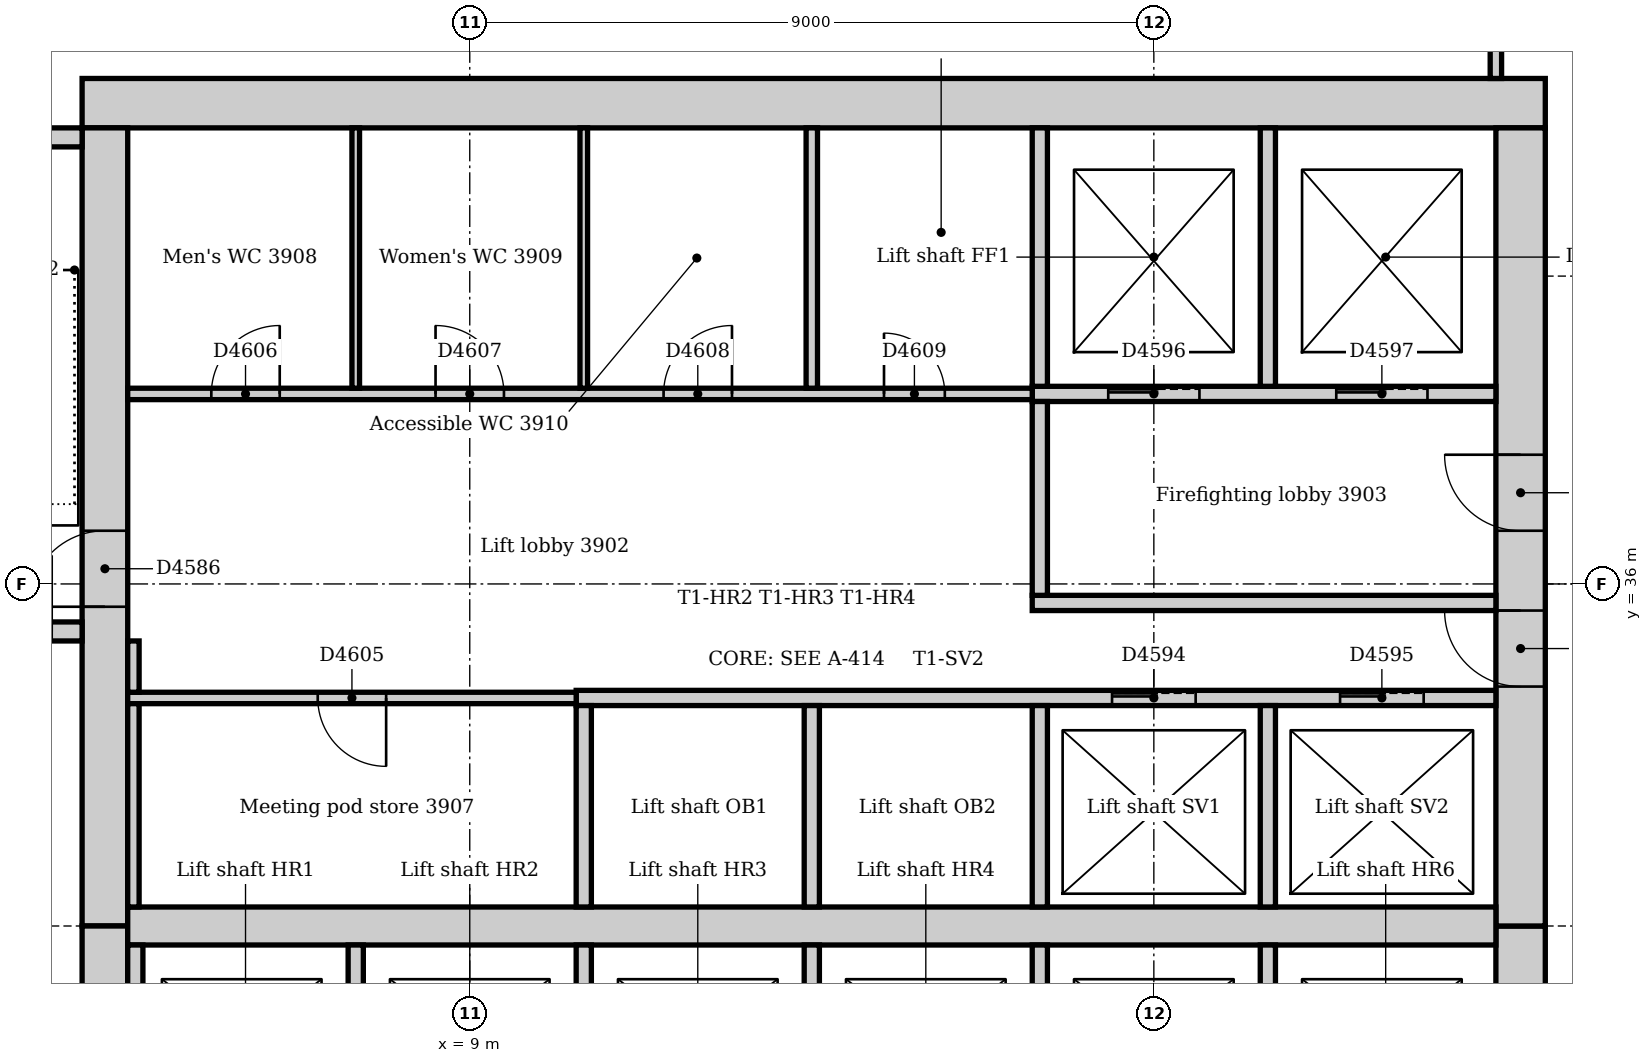
"""IFC4 building model, lengths in metres.
Left out: names, types, materials, properties, quantities, classifications, styles, units other than length and angle.
Written with IfcOpenShell. Run it as: python <this file> out.ifc"""

import sys

from ifc_helpers import new_model, si_unit, direction, frame, frame_2d, origin, place, context, subcontext, project, spatial, rectangle, extrude, element, fill, save


model = new_model("IFC4")
c1 = context("Model", 3, precision=1e-05, world=origin(), true_north=direction((0.0, 1.0)))
c2 = subcontext(c1, "Body", "Model", "MODEL_VIEW")
j1 = project(units=[si_unit("LENGTHUNIT", "METRE"), si_unit("PLANEANGLEUNIT", "RADIAN")], contexts=[c1])
p1 = place(None, origin())
s1 = spatial("IfcSite", under=j1, at=p1, CompositionType="ELEMENT")
p2 = place(p1, origin())
s2 = spatial("IfcBuilding", under=s1, at=p2, CompositionType="ELEMENT")
p3 = place(p2, frame((0.0, 0.0, 165.0)))
s3 = spatial("IfcBuildingStorey", under=s2, at=p3, CompositionType="ELEMENT", Elevation=165.0)
p4 = place(p3, frame((23.15, 42.325, 0.0), z_axis=(0.0, 0.0, 1.0), x_axis=(-1.0, 0.0, 0.0)))
e1 = element("IfcWall", 1, at=p4, inside=s3, PredefinedType="SOLIDWALL", context=c2, shape_type="SweptSolid", body=[
    extrude(rectangle(XDim=19.25, YDim=0.65, at=frame_2d((9.625, 0.0))), origin(), (0.0, 0.0, 1.0), 4.0),
])
p5 = place(p3, frame((22.825, 21.0, 0.0), z_axis=(0.0, 0.0, 1.0), x_axis=(0.0, 1.0, 0.0)))
e2 = element("IfcWall", 2, at=p5, inside=s3, PredefinedType="SOLIDWALL", context=c2, shape_type="SweptSolid", body=[
    extrude(rectangle(XDim=10.5, YDim=0.65, at=frame_2d((5.25, 0.0))), origin(), (0.0, 0.0, 1.0), 4.0),
])
p6 = place(p5, frame((4.35, 0.0, 0.0)))
e3 = element("IfcOpeningElement", 3, at=p6, cuts=e2, PredefinedType="OPENING", context=c2, shape_type="SweptSolid", body=[
    extrude(rectangle(XDim=1.8, YDim=2.1, at=frame_2d((0.9, 1.05))), frame((0.0, 0.335, 0.0), z_axis=(0.0, -1.0, 0.0), x_axis=(1.0, 0.0, 0.0)), (0.0, 0.0, 1.0), 0.67),
])
p7 = place(p3, frame((22.825, 31.5, 0.0), z_axis=(0.0, 0.0, 1.0), x_axis=(0.0, 1.0, 0.0)))
e4 = element("IfcWall", 4, at=p7, inside=s3, PredefinedType="SOLIDWALL", context=c2, shape_type="SweptSolid", body=[
    extrude(rectangle(XDim=10.5, YDim=0.65, at=frame_2d((5.25, 0.0))), origin(), (0.0, 0.0, 1.0), 4.0),
])
p8 = place(p7, frame((3.15, 0.0, 0.0)))
e5 = element("IfcOpeningElement", 5, at=p8, cuts=e4, PredefinedType="OPENING", context=c2, shape_type="SweptSolid", body=[
    extrude(rectangle(XDim=1.0, YDim=2.1, at=frame_2d((0.5, 1.05))), frame((0.0, 0.335, 0.0), z_axis=(0.0, -1.0, 0.0), x_axis=(1.0, 0.0, 0.0)), (0.0, 0.0, 1.0), 0.67),
])
p9 = place(p7, frame((5.2, 0.0, 0.0)))
e6 = element("IfcOpeningElement", 6, at=p9, cuts=e4, PredefinedType="OPENING", context=c2, shape_type="SweptSolid", body=[
    extrude(rectangle(XDim=1.0, YDim=2.1, at=frame_2d((0.5, 1.05))), frame((0.0, 0.335, 0.0), z_axis=(0.0, -1.0, 0.0), x_axis=(1.0, 0.0, 0.0)), (0.0, 0.0, 1.0), 0.67),
])
p10 = place(p3, frame((4.2, 42.0, 0.0), z_axis=(0.0, 0.0, 1.0), x_axis=(0.0, -1.0, 0.0)))
e7 = element("IfcWall", 7, at=p10, inside=s3, PredefinedType="SOLIDWALL", context=c2, shape_type="SweptSolid", body=[
    extrude(rectangle(XDim=10.5, YDim=0.6, at=frame_2d((5.25, 0.0))), origin(), (0.0, 0.0, 1.0), 4.0),
])
p11 = place(p10, frame((5.3, 0.0, 0.0)))
e8 = element("IfcOpeningElement", 8, at=p11, cuts=e7, PredefinedType="OPENING", context=c2, shape_type="SweptSolid", body=[
    extrude(rectangle(XDim=1.0, YDim=2.1, at=frame_2d((0.5, 1.05))), frame((0.0, 0.31, 0.0), z_axis=(0.0, -1.0, 0.0), x_axis=(1.0, 0.0, 0.0)), (0.0, 0.0, 1.0), 0.62),
])
p12 = place(p3, frame((4.2, 31.5, 0.0), z_axis=(0.0, 0.0, 1.0), x_axis=(0.0, -1.0, 0.0)))
e9 = element("IfcWall", 9, at=p12, inside=s3, PredefinedType="SOLIDWALL", context=c2, shape_type="SweptSolid", body=[
    extrude(rectangle(XDim=10.5, YDim=0.6, at=frame_2d((5.25, 0.0))), origin(), (0.0, 0.0, 1.0), 4.0),
])
p13 = place(p12, frame((4.25, 0.0, 0.0)))
e10 = element("IfcOpeningElement", 10, at=p13, cuts=e9, PredefinedType="OPENING", context=c2, shape_type="SweptSolid", body=[
    extrude(rectangle(XDim=1.0, YDim=2.1, at=frame_2d((0.5, 1.05))), frame((0.0, 0.31, 0.0), z_axis=(0.0, -1.0, 0.0), x_axis=(1.0, 0.0, 0.0)), (0.0, 0.0, 1.0), 0.62),
])
p14 = place(p3, frame((4.5, 31.5, 0.0), z_axis=(0.0, 0.0, 1.0), x_axis=(1.0, 0.0, 0.0)))
e11 = element("IfcWall", 11, at=p14, inside=s3, PredefinedType="SOLIDWALL", context=c2, shape_type="SweptSolid", body=[
    extrude(rectangle(XDim=18.0, YDim=0.5, at=frame_2d((9.0, 0.0))), origin(), (0.0, 0.0, 1.0), 4.0),
])
p15 = place(p3, frame((0.36, 35.375, 0.0), z_axis=(0.0, 0.0, 1.0), x_axis=(1.0, 0.0, 0.0)))
e12 = element("IfcWall", 12, at=p15, inside=s3, PredefinedType="SOLIDWALL", context=c2, shape_type="SweptSolid", body=[
    extrude(rectangle(XDim=3.54, YDim=0.25, at=frame_2d((1.77, 0.0))), origin(), (0.0, 0.0, 1.0), 4.0),
])
p16 = place(p15, frame((2.14, 0.0, 0.0)))
e13 = element("IfcOpeningElement", 13, at=p16, cuts=e12, PredefinedType="OPENING", context=c2, shape_type="SweptSolid", body=[
    extrude(rectangle(XDim=1.0, YDim=2.1, at=frame_2d((0.5, 1.05))), frame((0.0, 0.135, 0.0), z_axis=(0.0, -1.0, 0.0), x_axis=(1.0, 0.0, 0.0)), (0.0, 0.0, 1.0), 0.27),
])
p17 = place(p3, frame((3.9, 41.875, 0.0), z_axis=(0.0, 0.0, 1.0), x_axis=(-1.0, 0.0, 0.0)))
e14 = element("IfcWall", 14, at=p17, inside=s3, PredefinedType="SOLIDWALL", context=c2, shape_type="SweptSolid", body=[
    extrude(rectangle(XDim=3.54, YDim=0.25, at=frame_2d((1.77, 0.0))), origin(), (0.0, 0.0, 1.0), 4.0),
])
p18 = place(p3, frame((16.4, 35.75, 0.0), z_axis=(0.0, 0.0, 1.0), x_axis=(1.0, 0.0, 0.0)))
e15 = element("IfcWall", 15, at=p18, inside=s3, PredefinedType="PARTITIONING", context=c2, shape_type="SweptSolid", body=[
    extrude(rectangle(XDim=6.1, YDim=0.2, at=frame_2d((3.05, 0.0))), origin(), (0.0, 0.0, 1.0), 3.85),
])
p19 = place(p3, frame((16.4, 38.5, 0.0), z_axis=(0.0, 0.0, 1.0), x_axis=(1.0, 0.0, 0.0)))
e16 = element("IfcWall", 16, at=p19, inside=s3, PredefinedType="PARTITIONING", context=c2, shape_type="SweptSolid", body=[
    extrude(rectangle(XDim=6.1, YDim=0.2, at=frame_2d((3.05, 0.0))), origin(), (0.0, 0.0, 1.0), 3.85),
])
p20 = place(p19, frame((1.0, 0.0, 0.0)))
e17 = element("IfcOpeningElement", 17, at=p20, cuts=e16, PredefinedType="OPENING", context=c2, shape_type="SweptSolid", body=[
    extrude(rectangle(XDim=1.2, YDim=2.1, at=frame_2d((0.6, 1.05))), frame((0.0, 0.11, 0.0), z_axis=(0.0, -1.0, 0.0), x_axis=(1.0, 0.0, 0.0)), (0.0, 0.0, 1.0), 0.22),
])
p21 = place(p19, frame((4.0, 0.0, 0.0)))
e18 = element("IfcOpeningElement", 18, at=p21, cuts=e16, PredefinedType="OPENING", context=c2, shape_type="SweptSolid", body=[
    extrude(rectangle(XDim=1.2, YDim=2.1, at=frame_2d((0.6, 1.05))), frame((0.0, 0.11, 0.0), z_axis=(0.0, -1.0, 0.0), x_axis=(1.0, 0.0, 0.0)), (0.0, 0.0, 1.0), 0.22),
])
p22 = place(p3, frame((16.5, 35.85, 0.0), z_axis=(0.0, 0.0, 1.0), x_axis=(0.0, 1.0, 0.0)))
e19 = element("IfcWall", 19, at=p22, inside=s3, PredefinedType="PARTITIONING", context=c2, shape_type="SweptSolid", body=[
    extrude(rectangle(XDim=2.55, YDim=0.2, at=frame_2d((1.275, 0.0))), origin(), (0.0, 0.0, 1.0), 3.85),
])
p23 = place(p3, frame((10.4, 34.5, 0.0), z_axis=(0.0, 0.0, 1.0), x_axis=(1.0, 0.0, 0.0)))
e20 = element("IfcWall", 20, at=p23, inside=s3, PredefinedType="PARTITIONING", context=c2, shape_type="SweptSolid", body=[
    extrude(rectangle(XDim=12.1, YDim=0.2, at=frame_2d((6.05, 0.0))), origin(), (0.0, 0.0, 1.0), 3.85),
])
p24 = place(p23, frame((7.05, 0.0, 0.0)))
e21 = element("IfcOpeningElement", 21, at=p24, cuts=e20, PredefinedType="OPENING", context=c2, shape_type="SweptSolid", body=[
    extrude(rectangle(XDim=1.1, YDim=2.1, at=frame_2d((0.55, 1.05))), frame((0.0, 0.11, 0.0), z_axis=(0.0, -1.0, 0.0), x_axis=(1.0, 0.0, 0.0)), (0.0, 0.0, 1.0), 0.22),
])
p25 = place(p23, frame((10.05, 0.0, 0.0)))
e22 = element("IfcOpeningElement", 22, at=p25, cuts=e20, PredefinedType="OPENING", context=c2, shape_type="SweptSolid", body=[
    extrude(rectangle(XDim=1.1, YDim=2.1, at=frame_2d((0.55, 1.05))), frame((0.0, 0.11, 0.0), z_axis=(0.0, -1.0, 0.0), x_axis=(1.0, 0.0, 0.0)), (0.0, 0.0, 1.0), 0.22),
])
for number, where, z_axis, x_axis in (
    (23, (10.5, 28.6, 0.0), (0.0, 0.0, 1.0), (0.0, 1.0, 0.0)),
    (24, (10.5, 31.75, 0.0), (0.0, 0.0, 1.0), (0.0, 1.0, 0.0)),
    (25, (13.5, 28.6, 0.0), (0.0, 0.0, 1.0), (0.0, 1.0, 0.0)),
    (26, (13.5, 31.75, 0.0), (0.0, 0.0, 1.0), (0.0, 1.0, 0.0)),
    (27, (16.5, 28.6, 0.0), (0.0, 0.0, 1.0), (0.0, 1.0, 0.0)),
    (28, (16.5, 31.75, 0.0), (0.0, 0.0, 1.0), (0.0, 1.0, 0.0)),
    (29, (19.5, 28.6, 0.0), (0.0, 0.0, 1.0), (0.0, 1.0, 0.0)),
    (30, (19.5, 31.75, 0.0), (0.0, 0.0, 1.0), (0.0, 1.0, 0.0)),
):
    element("IfcWall", number, at=place(p3, frame(where, z_axis=z_axis, x_axis=x_axis)), inside=s3, PredefinedType="PARTITIONING", context=c2, shape_type="SweptSolid", body=[
        extrude(rectangle(XDim=2.65, YDim=0.2, at=frame_2d((1.325, 0.0))), origin(), (0.0, 0.0, 1.0), 3.85),
    ])
for number, where, z_axis, x_axis in (
    (31, (16.5, 38.6, 0.0), (0.0, 0.0, 1.0), (0.0, 1.0, 0.0)),
    (32, (19.5, 38.6, 0.0), (0.0, 0.0, 1.0), (0.0, 1.0, 0.0)),
):
    element("IfcWall", number, at=place(p3, frame(where, z_axis=z_axis, x_axis=x_axis)), inside=s3, PredefinedType="PARTITIONING", context=c2, shape_type="SweptSolid", body=[
        extrude(rectangle(XDim=3.4, YDim=0.2, at=frame_2d((1.7, 0.0))), origin(), (0.0, 0.0, 1.0), 3.85),
    ])
for number, where, z_axis, x_axis in (
    (33, (4.6, 28.6, 0.0), (0.0, 0.0, 1.0), (0.0, 1.0, 0.0)),
    (34, (7.5, 28.6, 0.0), (0.0, 0.0, 1.0), (0.0, 1.0, 0.0)),
):
    element("IfcWall", number, at=place(p3, frame(where, z_axis=z_axis, x_axis=x_axis)), inside=s3, PredefinedType="PARTITIONING", context=c2, shape_type="SweptSolid", body=[
        extrude(rectangle(XDim=2.65, YDim=0.2, at=frame_2d((1.325, 0.0))), origin(), (0.0, 0.0, 1.0), 3.85),
    ])
p26 = place(p3, frame((4.5, 38.5, 0.0), z_axis=(0.0, 0.0, 1.0), x_axis=(1.0, 0.0, 0.0)))
e35 = element("IfcWall", 35, at=p26, inside=s3, PredefinedType="PARTITIONING", context=c2, shape_type="SweptSolid", body=[
    extrude(rectangle(XDim=11.9, YDim=0.15, at=frame_2d((5.95, 0.0))), origin(), (0.0, 0.0, 1.0), 3.85),
])
p27 = place(p26, frame((1.1, 0.0, 0.0)))
e36 = element("IfcOpeningElement", 36, at=p27, cuts=e35, PredefinedType="OPENING", context=c2, shape_type="SweptSolid", body=[
    extrude(rectangle(XDim=0.9, YDim=2.1, at=frame_2d((0.45, 1.05))), frame((0.0, 0.085, 0.0), z_axis=(0.0, -1.0, 0.0), x_axis=(1.0, 0.0, 0.0)), (0.0, 0.0, 1.0), 0.17),
])
p28 = place(p26, frame((4.05, 0.0, 0.0)))
e37 = element("IfcOpeningElement", 37, at=p28, cuts=e35, PredefinedType="OPENING", context=c2, shape_type="SweptSolid", body=[
    extrude(rectangle(XDim=0.9, YDim=2.1, at=frame_2d((0.45, 1.05))), frame((0.0, 0.085, 0.0), z_axis=(0.0, -1.0, 0.0), x_axis=(1.0, 0.0, 0.0)), (0.0, 0.0, 1.0), 0.17),
])
p29 = place(p26, frame((7.05, 0.0, 0.0)))
e38 = element("IfcOpeningElement", 38, at=p29, cuts=e35, PredefinedType="OPENING", context=c2, shape_type="SweptSolid", body=[
    extrude(rectangle(XDim=0.9, YDim=2.1, at=frame_2d((0.45, 1.05))), frame((0.0, 0.085, 0.0), z_axis=(0.0, -1.0, 0.0), x_axis=(1.0, 0.0, 0.0)), (0.0, 0.0, 1.0), 0.17),
])
p30 = place(p26, frame((9.95, 0.0, 0.0)))
e39 = element("IfcOpeningElement", 39, at=p30, cuts=e35, PredefinedType="OPENING", context=c2, shape_type="SweptSolid", body=[
    extrude(rectangle(XDim=0.8, YDim=2.1, at=frame_2d((0.4, 1.05))), frame((0.0, 0.085, 0.0), z_axis=(0.0, -1.0, 0.0), x_axis=(1.0, 0.0, 0.0)), (0.0, 0.0, 1.0), 0.17),
])
p31 = place(p3, frame((4.5, 34.5, 0.0), z_axis=(0.0, 0.0, 1.0), x_axis=(1.0, 0.0, 0.0)))
e40 = element("IfcWall", 40, at=p31, inside=s3, PredefinedType="PARTITIONING", context=c2, shape_type="SweptSolid", body=[
    extrude(rectangle(XDim=5.9, YDim=0.15, at=frame_2d((2.95, 0.0))), origin(), (0.0, 0.0, 1.0), 3.85),
])
p32 = place(p31, frame((2.5, 0.0, 0.0)))
e41 = element("IfcOpeningElement", 41, at=p32, cuts=e40, PredefinedType="OPENING", context=c2, shape_type="SweptSolid", body=[
    extrude(rectangle(XDim=0.9, YDim=2.1, at=frame_2d((0.45, 1.05))), frame((0.0, 0.085, 0.0), z_axis=(0.0, -1.0, 0.0), x_axis=(1.0, 0.0, 0.0)), (0.0, 0.0, 1.0), 0.17),
])
p33 = place(p3, frame((4.575, 34.575, 0.0), z_axis=(0.0, 0.0, 1.0), x_axis=(0.0, 1.0, 0.0)))
e42 = element("IfcWall", 42, at=p33, inside=s3, PredefinedType="PARTITIONING", context=c2, shape_type="SweptSolid", body=[
    extrude(rectangle(XDim=0.675, YDim=0.15, at=frame_2d((0.338, 0.0))), origin(), (0.0, 0.0, 1.0), 3.85),
])
p34 = place(p3, frame((4.575, 31.75, 0.0), z_axis=(0.0, 0.0, 1.0), x_axis=(0.0, 1.0, 0.0)))
e43 = element("IfcWall", 43, at=p34, inside=s3, PredefinedType="PARTITIONING", context=c2, shape_type="SweptSolid", body=[
    extrude(rectangle(XDim=2.675, YDim=0.15, at=frame_2d((1.337, 0.0))), origin(), (0.0, 0.0, 1.0), 3.85),
])
p35 = place(p3, frame((22.5, 42.65, 0.0), z_axis=(0.0, 0.0, 1.0), x_axis=(0.0, 1.0, 0.0)))
e44 = element("IfcWall", 44, at=p35, inside=s3, PredefinedType="PARTITIONING", context=c2, shape_type="SweptSolid", body=[
    extrude(rectangle(XDim=1.825, YDim=0.15, at=frame_2d((0.912, 0.0))), origin(), (0.0, 0.0, 1.0), 3.85),
])
p36 = place(p3, frame((13.5, 38.575, 0.0), z_axis=(0.0, 0.0, 1.0), x_axis=(0.0, 1.0, 0.0)))
e45 = element("IfcWall", 45, at=p36, inside=s3, PredefinedType="PARTITIONING", context=c2, shape_type="SweptSolid", body=[
    extrude(rectangle(XDim=3.425, YDim=0.15, at=frame_2d((1.712, 0.0))), origin(), (0.0, 0.0, 1.0), 3.85),
])
for number, where, z_axis, x_axis in (
    (46, (7.5, 38.575, 0.0), (0.0, 0.0, 1.0), (0.0, 1.0, 0.0)),
    (47, (10.5, 38.575, 0.0), (0.0, 0.0, 1.0), (0.0, 1.0, 0.0)),
):
    element("IfcWall", number, at=place(p3, frame(where, z_axis=z_axis, x_axis=x_axis)), inside=s3, PredefinedType="PARTITIONING", context=c2, shape_type="SweptSolid", body=[
        extrude(rectangle(XDim=3.425, YDim=0.1, at=frame_2d((1.712, 0.0))), origin(), (0.0, 0.0, 1.0), 3.85),
    ])
p37 = place(p11, frame((1.0, 0.0, 0.0), z_axis=(0.0, 0.0, 1.0), x_axis=(-1.0, 0.0, 0.0)))
e48 = element("IfcDoor", 48, at=p37, inside=s3, OperationType="SINGLE_SWING_LEFT", PredefinedType="DOOR", context=c2, shape_type="SweptSolid", body=[
    extrude(rectangle(XDim=1.0, YDim=2.1, at=frame_2d((0.5, 1.05))), frame((0.0, 0.025, 0.0), z_axis=(0.0, -1.0, 0.0), x_axis=(1.0, 0.0, 0.0)), (0.0, 0.0, 1.0), 0.05),
])
fill(e8, e48)
p38 = place(p24, origin())
e49 = element("IfcDoor", 49, at=p38, inside=s3, OperationType="SLIDING_TO_LEFT", PredefinedType="DOOR", context=c2, shape_type="SweptSolid", body=[
    extrude(rectangle(XDim=1.1, YDim=2.1, at=frame_2d((0.55, 1.05))), frame((0.0, 0.025, 0.0), z_axis=(0.0, -1.0, 0.0), x_axis=(1.0, 0.0, 0.0)), (0.0, 0.0, 1.0), 0.05),
])
fill(e21, e49)
p39 = place(p25, origin())
e50 = element("IfcDoor", 50, at=p39, inside=s3, OperationType="SLIDING_TO_LEFT", PredefinedType="DOOR", context=c2, shape_type="SweptSolid", body=[
    extrude(rectangle(XDim=1.1, YDim=2.1, at=frame_2d((0.55, 1.05))), frame((0.0, 0.025, 0.0), z_axis=(0.0, -1.0, 0.0), x_axis=(1.0, 0.0, 0.0)), (0.0, 0.0, 1.0), 0.05),
])
fill(e22, e50)
p40 = place(p20, origin())
e51 = element("IfcDoor", 51, at=p40, inside=s3, OperationType="SLIDING_TO_LEFT", PredefinedType="DOOR", context=c2, shape_type="SweptSolid", body=[
    extrude(rectangle(XDim=1.2, YDim=2.1, at=frame_2d((0.6, 1.05))), frame((0.0, 0.025, 0.0), z_axis=(0.0, -1.0, 0.0), x_axis=(1.0, 0.0, 0.0)), (0.0, 0.0, 1.0), 0.05),
])
fill(e17, e51)
p41 = place(p21, origin())
e52 = element("IfcDoor", 52, at=p41, inside=s3, OperationType="SLIDING_TO_LEFT", PredefinedType="DOOR", context=c2, shape_type="SweptSolid", body=[
    extrude(rectangle(XDim=1.2, YDim=2.1, at=frame_2d((0.6, 1.05))), frame((0.0, 0.025, 0.0), z_axis=(0.0, -1.0, 0.0), x_axis=(1.0, 0.0, 0.0)), (0.0, 0.0, 1.0), 0.05),
])
fill(e18, e52)
p42 = place(p8, origin())
e53 = element("IfcDoor", 53, at=p42, inside=s3, OperationType="SINGLE_SWING_RIGHT", PredefinedType="DOOR", context=c2, shape_type="SweptSolid", body=[
    extrude(rectangle(XDim=1.0, YDim=2.1, at=frame_2d((0.5, 1.05))), frame((0.0, 0.025, 0.0), z_axis=(0.0, -1.0, 0.0), x_axis=(1.0, 0.0, 0.0)), (0.0, 0.0, 1.0), 0.05),
])
fill(e5, e53)
p43 = place(p9, origin())
e54 = element("IfcDoor", 54, at=p43, inside=s3, OperationType="SINGLE_SWING_RIGHT", PredefinedType="DOOR", context=c2, shape_type="SweptSolid", body=[
    extrude(rectangle(XDim=1.0, YDim=2.1, at=frame_2d((0.5, 1.05))), frame((0.0, 0.025, 0.0), z_axis=(0.0, -1.0, 0.0), x_axis=(1.0, 0.0, 0.0)), (0.0, 0.0, 1.0), 0.05),
])
fill(e6, e54)
p44 = place(p32, frame((0.9, 0.0, 0.0), z_axis=(0.0, 0.0, 1.0), x_axis=(-1.0, 0.0, 0.0)))
e55 = element("IfcDoor", 55, at=p44, inside=s3, OperationType="SINGLE_SWING_LEFT", PredefinedType="DOOR", context=c2, shape_type="SweptSolid", body=[
    extrude(rectangle(XDim=0.9, YDim=2.1, at=frame_2d((0.45, 1.05))), frame((0.0, 0.025, 0.0), z_axis=(0.0, -1.0, 0.0), x_axis=(1.0, 0.0, 0.0)), (0.0, 0.0, 1.0), 0.05),
])
fill(e41, e55)
p45 = place(p27, origin())
e56 = element("IfcDoor", 56, at=p45, inside=s3, OperationType="SINGLE_SWING_RIGHT", PredefinedType="DOOR", context=c2, shape_type="SweptSolid", body=[
    extrude(rectangle(XDim=0.9, YDim=2.1, at=frame_2d((0.45, 1.05))), frame((0.0, 0.025, 0.0), z_axis=(0.0, -1.0, 0.0), x_axis=(1.0, 0.0, 0.0)), (0.0, 0.0, 1.0), 0.05),
])
fill(e36, e56)
p46 = place(p28, origin())
e57 = element("IfcDoor", 57, at=p46, inside=s3, OperationType="SINGLE_SWING_LEFT", PredefinedType="DOOR", context=c2, shape_type="SweptSolid", body=[
    extrude(rectangle(XDim=0.9, YDim=2.1, at=frame_2d((0.45, 1.05))), frame((0.0, 0.025, 0.0), z_axis=(0.0, -1.0, 0.0), x_axis=(1.0, 0.0, 0.0)), (0.0, 0.0, 1.0), 0.05),
])
fill(e37, e57)
p47 = place(p29, origin())
e58 = element("IfcDoor", 58, at=p47, inside=s3, OperationType="SINGLE_SWING_RIGHT", PredefinedType="DOOR", context=c2, shape_type="SweptSolid", body=[
    extrude(rectangle(XDim=0.9, YDim=2.1, at=frame_2d((0.45, 1.05))), frame((0.0, 0.025, 0.0), z_axis=(0.0, -1.0, 0.0), x_axis=(1.0, 0.0, 0.0)), (0.0, 0.0, 1.0), 0.05),
])
fill(e38, e58)
p48 = place(p30, origin())
e59 = element("IfcDoor", 59, at=p48, inside=s3, OperationType="SINGLE_SWING_LEFT", PredefinedType="DOOR", context=c2, shape_type="SweptSolid", body=[
    extrude(rectangle(XDim=0.8, YDim=2.1, at=frame_2d((0.4, 1.05))), frame((0.0, 0.025, 0.0), z_axis=(0.0, -1.0, 0.0), x_axis=(1.0, 0.0, 0.0)), (0.0, 0.0, 1.0), 0.05),
])
fill(e39, e59)
save(model, sys.argv[1])
